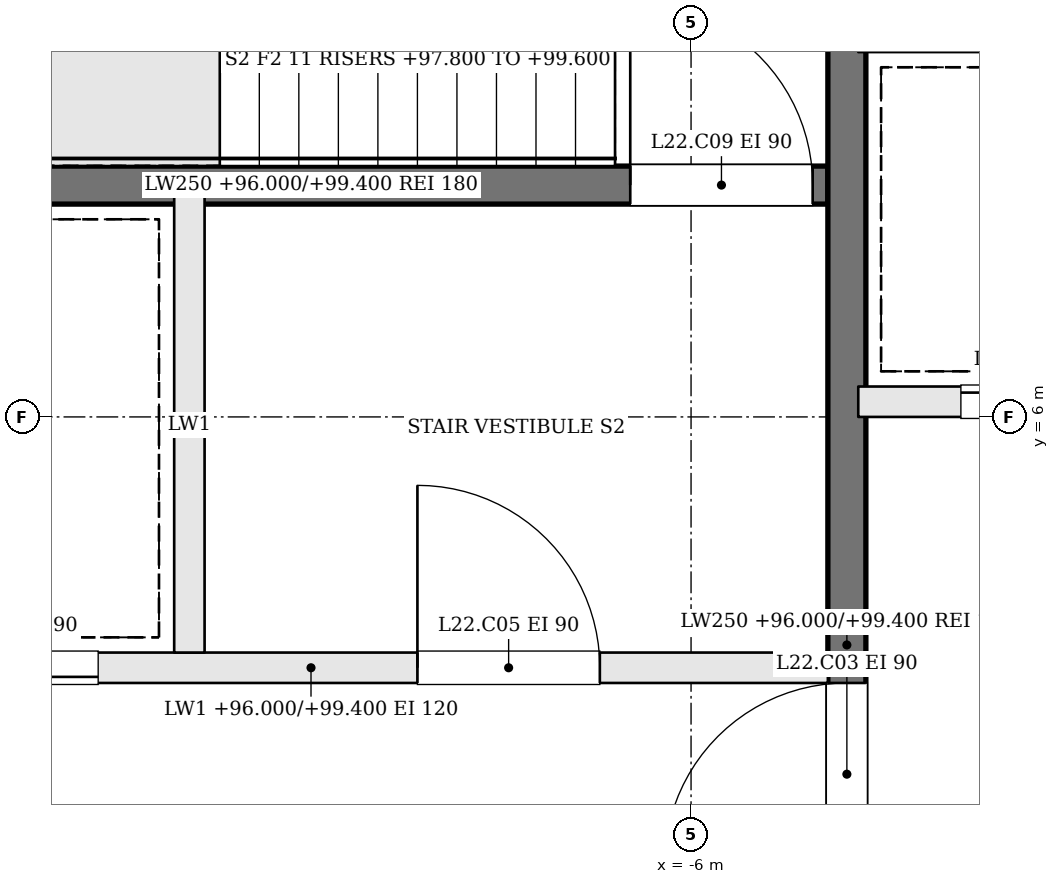
"""IFC4 building model, lengths in metres.
Left out: names, types, materials, properties, quantities, classifications, styles, units other than length and angle.
Written with IfcOpenShell. Run it as: python <this file> out.ifc"""

import sys

from ifc_helpers import new_model, si_unit, direction, frame, frame_2d, origin, place, context, subcontext, project, spatial, rectangle, extrude, element, fill, save


model = new_model("IFC4")
c1 = context("Model", 3, precision=1e-05, world=origin(), true_north=direction((0.0, 1.0)))
c2 = subcontext(c1, "Body", "Model", "MODEL_VIEW")
j1 = project(units=[si_unit("LENGTHUNIT", "METRE"), si_unit("PLANEANGLEUNIT", "RADIAN")], contexts=[c1])
p1 = place(None, origin())
s1 = spatial("IfcSite", under=j1, at=p1, CompositionType="ELEMENT")
p2 = place(p1, origin())
s2 = spatial("IfcBuilding", under=s1, at=p2, CompositionType="ELEMENT")
p3 = place(p2, frame((0.0, 0.0, 96.0)))
s3 = spatial("IfcBuildingStorey", under=s2, at=p3, CompositionType="ELEMENT", Elevation=96.0)
p4 = place(p3, frame((-11.9, 4.35, 0.0), z_axis=(0.0, 0.0, 1.0), x_axis=(1.0, 0.0, 0.0)))
e1 = element("IfcWall", 1, at=p4, inside=s3, PredefinedType="SOLIDWALL", context=c2, shape_type="SweptSolid", body=[
    extrude(rectangle(XDim=6.8, YDim=0.2, at=frame_2d((3.4, 0.0))), origin(), (0.0, 0.0, 1.0), 3.4),
])
p5 = place(p4, frame((4.1, 0.0, 0.0)))
e2 = element("IfcOpeningElement", 2, at=p5, cuts=e1, PredefinedType="OPENING", context=c2, shape_type="SweptSolid", body=[
    extrude(rectangle(XDim=1.2, YDim=2.1, at=frame_2d((0.6, 1.05))), frame((0.0, 0.11, 0.0), z_axis=(0.0, -1.0, 0.0), x_axis=(1.0, 0.0, 0.0)), (0.0, 0.0, 1.0), 0.22),
])
p6 = place(p4, frame((0.8, 0.0, 0.0)))
e3 = element("IfcOpeningElement", 3, at=p6, cuts=e1, PredefinedType="OPENING", context=c2, shape_type="SweptSolid", body=[
    extrude(rectangle(XDim=1.2, YDim=2.1, at=frame_2d((0.6, 1.05))), frame((0.0, 0.11, 0.0), z_axis=(0.0, -1.0, 0.0), x_axis=(1.0, 0.0, 0.0)), (0.0, 0.0, 1.0), 0.22),
])
p7 = place(p3, frame((-11.9, 7.525, 0.0), z_axis=(0.0, 0.0, 1.0), x_axis=(1.0, 0.0, 0.0)))
e4 = element("IfcWall", 4, at=p7, inside=s3, PredefinedType="SOLIDWALL", context=c2, shape_type="SweptSolid", body=[
    extrude(rectangle(XDim=6.8, YDim=0.25, at=frame_2d((3.4, 0.0))), origin(), (0.0, 0.0, 1.0), 3.4),
])
p8 = place(p7, frame((5.5, 0.0, 0.0)))
e5 = element("IfcOpeningElement", 5, at=p8, cuts=e4, PredefinedType="OPENING", context=c2, shape_type="SweptSolid", body=[
    extrude(rectangle(XDim=1.2, YDim=2.1, at=frame_2d((0.6, 1.05))), frame((0.0, 0.135, 0.0), z_axis=(0.0, -1.0, 0.0), x_axis=(1.0, 0.0, 0.0)), (0.0, 0.0, 1.0), 0.27),
])
p9 = place(p3, frame((-9.3, 4.45, 0.0), z_axis=(0.0, 0.0, 1.0), x_axis=(0.0, 1.0, 0.0)))
e6 = element("IfcWall", 6, at=p9, inside=s3, PredefinedType="SOLIDWALL", context=c2, shape_type="SweptSolid", body=[
    extrude(rectangle(XDim=3.0, YDim=0.2, at=frame_2d((1.5, 0.0))), origin(), (0.0, 0.0, 1.0), 3.4),
])
p10 = place(p3, frame((-4.975, -1.9, 0.0), z_axis=(0.0, 0.0, 1.0), x_axis=(0.0, 1.0, 0.0)))
e7 = element("IfcWall", 7, at=p10, inside=s3, PredefinedType="SOLIDWALL", context=c2, shape_type="SweptSolid", body=[
    extrude(rectangle(XDim=12.8, YDim=0.25, at=frame_2d((6.4, 0.0))), origin(), (0.0, 0.0, 1.0), 3.4),
])
p11 = place(p10, frame((4.95, 0.0, 0.0)))
e8 = element("IfcOpeningElement", 8, at=p11, cuts=e7, PredefinedType="OPENING", context=c2, shape_type="SweptSolid", body=[
    extrude(rectangle(XDim=1.2, YDim=2.1, at=frame_2d((0.6, 1.05))), frame((0.0, 0.135, 0.0), z_axis=(0.0, -1.0, 0.0), x_axis=(1.0, 0.0, 0.0)), (0.0, 0.0, 1.0), 0.27),
])
p12 = place(p3, frame((-4.9, 6.1, 0.0), z_axis=(0.0, 0.0, 1.0), x_axis=(1.0, 0.0, 0.0)))
e9 = element("IfcWall", 9, at=p12, inside=s3, PredefinedType="SOLIDWALL", context=c2, shape_type="SweptSolid", body=[
    extrude(rectangle(XDim=9.8, YDim=0.2, at=frame_2d((4.9, 0.0))), origin(), (0.0, 0.0, 1.0), 3.4),
])
p13 = place(p12, frame((0.675, 0.0, 0.0)))
e10 = element("IfcOpeningElement", 10, at=p13, cuts=e9, PredefinedType="OPENING", context=c2, shape_type="SweptSolid", body=[
    extrude(rectangle(XDim=1.1, YDim=2.1, at=frame_2d((0.55, 1.05))), frame((0.0, 0.11, 0.0), z_axis=(0.0, -1.0, 0.0), x_axis=(1.0, 0.0, 0.0)), (0.0, 0.0, 1.0), 0.22),
])
p14 = place(p12, frame((3.125, 0.0, 0.0)))
e11 = element("IfcOpeningElement", 11, at=p14, cuts=e9, PredefinedType="OPENING", context=c2, shape_type="SweptSolid", body=[
    extrude(rectangle(XDim=1.1, YDim=2.1, at=frame_2d((0.55, 1.05))), frame((0.0, 0.11, 0.0), z_axis=(0.0, -1.0, 0.0), x_axis=(1.0, 0.0, 0.0)), (0.0, 0.0, 1.0), 0.22),
])
p15 = place(p12, frame((5.575, 0.0, 0.0)))
e12 = element("IfcOpeningElement", 12, at=p15, cuts=e9, PredefinedType="OPENING", context=c2, shape_type="SweptSolid", body=[
    extrude(rectangle(XDim=1.1, YDim=2.1, at=frame_2d((0.55, 1.05))), frame((0.0, 0.11, 0.0), z_axis=(0.0, -1.0, 0.0), x_axis=(1.0, 0.0, 0.0)), (0.0, 0.0, 1.0), 0.22),
])
p16 = place(p12, frame((8.025, 0.0, 0.0)))
e13 = element("IfcOpeningElement", 13, at=p16, cuts=e9, PredefinedType="OPENING", context=c2, shape_type="SweptSolid", body=[
    extrude(rectangle(XDim=1.1, YDim=2.1, at=frame_2d((0.55, 1.05))), frame((0.0, 0.11, 0.0), z_axis=(0.0, -1.0, 0.0), x_axis=(1.0, 0.0, 0.0)), (0.0, 0.0, 1.0), 0.22),
])
p17 = place(p11, origin())
e14 = element("IfcDoor", 14, at=p17, inside=s3, OperationType="SINGLE_SWING_LEFT", PredefinedType="DOOR", context=c2, shape_type="SweptSolid", body=[
    extrude(rectangle(XDim=1.2, YDim=2.1, at=frame_2d((0.6, 1.05))), frame((0.0, 0.025, 0.0), z_axis=(0.0, -1.0, 0.0), x_axis=(1.0, 0.0, 0.0)), (0.0, 0.0, 1.0), 0.05),
])
fill(e8, e14)
p18 = place(p5, origin())
e15 = element("IfcDoor", 15, at=p18, inside=s3, OperationType="SINGLE_SWING_LEFT", PredefinedType="DOOR", context=c2, shape_type="SweptSolid", body=[
    extrude(rectangle(XDim=1.2, YDim=2.1, at=frame_2d((0.6, 1.05))), frame((0.0, 0.025, 0.0), z_axis=(0.0, -1.0, 0.0), x_axis=(1.0, 0.0, 0.0)), (0.0, 0.0, 1.0), 0.05),
])
fill(e2, e15)
p19 = place(p8, origin())
e16 = element("IfcDoor", 16, at=p19, inside=s3, OperationType="SINGLE_SWING_LEFT", PredefinedType="DOOR", context=c2, shape_type="SweptSolid", body=[
    extrude(rectangle(XDim=1.2, YDim=2.1, at=frame_2d((0.6, 1.05))), frame((0.0, 0.025, 0.0), z_axis=(0.0, -1.0, 0.0), x_axis=(1.0, 0.0, 0.0)), (0.0, 0.0, 1.0), 0.05),
])
fill(e5, e16)
p20 = place(p6, origin())
e17 = element("IfcDoor", 17, at=p20, inside=s3, OperationType="SLIDING_TO_RIGHT", PredefinedType="DOOR", context=c2, shape_type="SweptSolid", body=[
    extrude(rectangle(XDim=1.2, YDim=2.1, at=frame_2d((0.6, 1.05))), frame((0.0, 0.025, 0.0), z_axis=(0.0, -1.0, 0.0), x_axis=(1.0, 0.0, 0.0)), (0.0, 0.0, 1.0), 0.05),
])
fill(e3, e17)
p21 = place(p13, origin())
e18 = element("IfcDoor", 18, at=p21, inside=s3, OperationType="SLIDING_TO_RIGHT", PredefinedType="DOOR", context=c2, shape_type="SweptSolid", body=[
    extrude(rectangle(XDim=1.1, YDim=2.1, at=frame_2d((0.55, 1.05))), frame((0.0, 0.025, 0.0), z_axis=(0.0, -1.0, 0.0), x_axis=(1.0, 0.0, 0.0)), (0.0, 0.0, 1.0), 0.05),
])
fill(e10, e18)
save(model, sys.argv[1])
